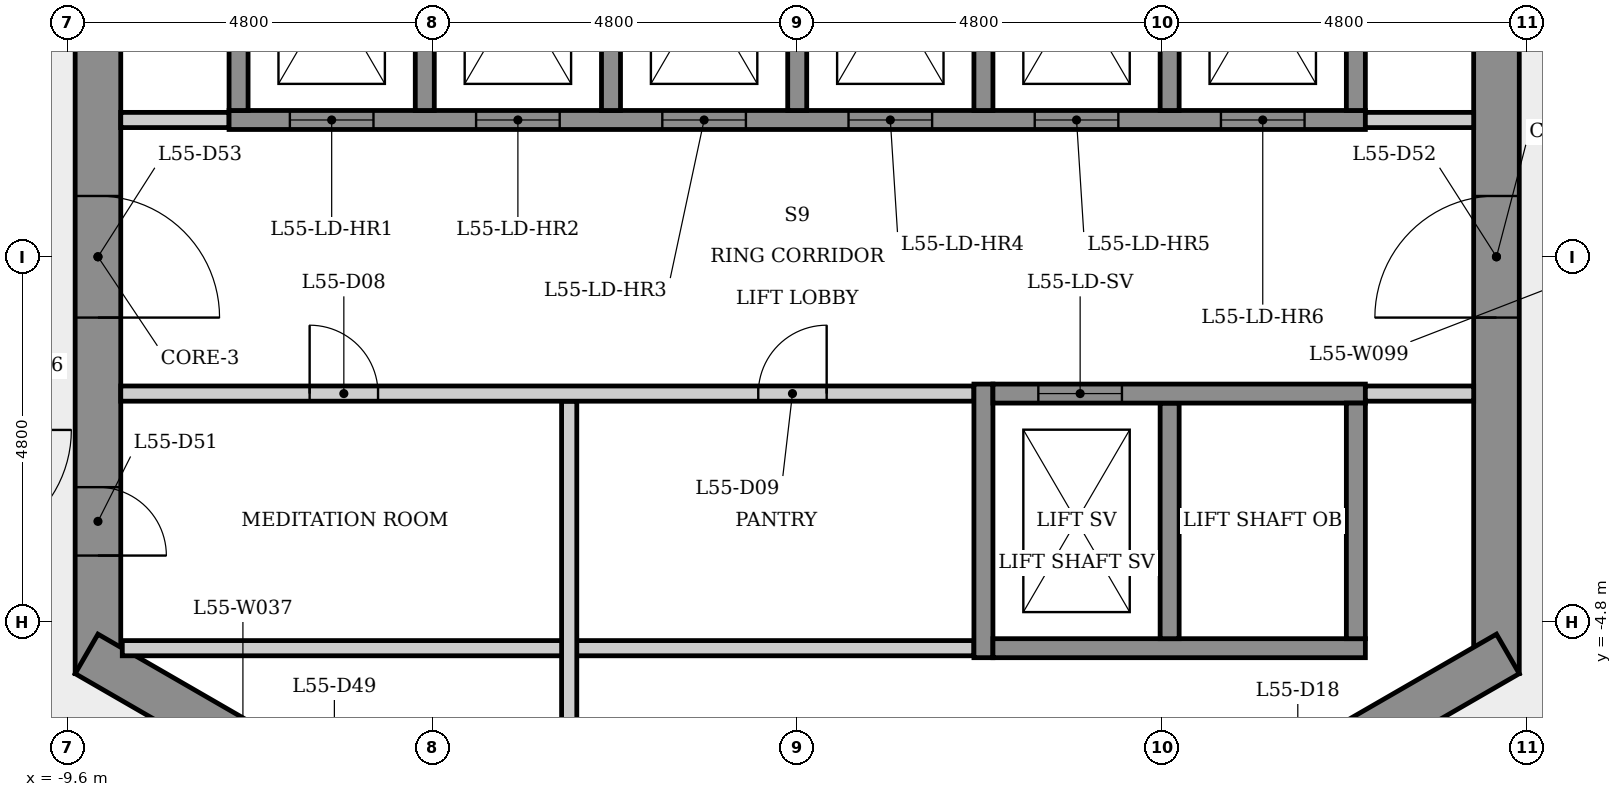
"""IFC4 building model, lengths in metres.
Left out: names, types, materials, properties, quantities, classifications, styles, units other than length and angle.
Written with IfcOpenShell. Run it as: python <this file> out.ifc"""

import sys

from ifc_helpers import new_model, si_unit, direction, frame, frame_2d, origin, place, context, subcontext, project, spatial, rectangle, extrude, element, fill, save


model = new_model("IFC4")
c1 = context("Model", 3, precision=1e-05, world=origin(), true_north=direction((0.0, 1.0)))
c2 = subcontext(c1, "Body", "Model", "MODEL_VIEW")
j1 = project(units=[si_unit("LENGTHUNIT", "METRE"), si_unit("PLANEANGLEUNIT", "RADIAN")], contexts=[c1])
p1 = place(None, origin())
s1 = spatial("IfcSite", under=j1, at=p1, CompositionType="ELEMENT")
p2 = place(p1, origin())
s2 = spatial("IfcBuilding", under=s1, at=p2, CompositionType="ELEMENT")
p3 = place(p2, frame((0.0, 0.0, 206.1)))
s3 = spatial("IfcBuildingStorey", under=s2, at=p3, CompositionType="ELEMENT", Elevation=206.1)
p4 = place(p3, frame((9.2, -5.485, 0.0), z_axis=(0.0, 0.0, 1.0), x_axis=(0.0, 1.0, 0.0)))
e1 = element("IfcWall", 1, at=p4, inside=s3, PredefinedType="SHEAR", context=c2, shape_type="SweptSolid", body=[
    extrude(rectangle(XDim=10.97, YDim=0.6, at=frame_2d((5.485, 0.0))), origin(), (0.0, 0.0, 1.0), 4.0),
])
p5 = place(p4, frame((4.685, 0.0, 0.0)))
e2 = element("IfcOpeningElement", 2, at=p5, cuts=e1, PredefinedType="OPENING", context=c2, shape_type="SweptSolid", body=[
    extrude(rectangle(XDim=1.6, YDim=2.1, at=frame_2d((0.8, 1.05))), frame((0.0, 0.31, 0.0), z_axis=(0.0, -1.0, 0.0), x_axis=(1.0, 0.0, 0.0)), (0.0, 0.0, 1.0), 0.62),
])
p6 = place(p3, frame((-9.2, 5.485, 0.0), z_axis=(0.0, 0.0, 1.0), x_axis=(0.0, -1.0, 0.0)))
e3 = element("IfcWall", 3, at=p6, inside=s3, PredefinedType="SHEAR", context=c2, shape_type="SweptSolid", body=[
    extrude(rectangle(XDim=10.97, YDim=0.6, at=frame_2d((5.485, 0.0))), origin(), (0.0, 0.0, 1.0), 4.0),
])
p7 = place(p6, frame((8.516, 0.0, 0.0)))
e4 = element("IfcOpeningElement", 4, at=p7, cuts=e3, PredefinedType="OPENING", context=c2, shape_type="SweptSolid", body=[
    extrude(rectangle(XDim=0.9, YDim=2.1, at=frame_2d((0.45, 1.05))), frame((0.0, 0.31, 0.0), z_axis=(0.0, -1.0, 0.0), x_axis=(1.0, 0.0, 0.0)), (0.0, 0.0, 1.0), 0.62),
])
p8 = place(p6, frame((4.685, 0.0, 0.0)))
e5 = element("IfcOpeningElement", 5, at=p8, cuts=e3, PredefinedType="OPENING", context=c2, shape_type="SweptSolid", body=[
    extrude(rectangle(XDim=1.6, YDim=2.1, at=frame_2d((0.8, 1.05))), frame((0.0, 0.31, 0.0), z_axis=(0.0, -1.0, 0.0), x_axis=(1.0, 0.0, 0.0)), (0.0, 0.0, 1.0), 0.62),
])
p9 = place(p3, frame((-9.35, -5.225, 0.0), z_axis=(0.0, 0.0, 1.0), x_axis=(0.866023993627, -0.500002442456, 0.0)))
e6 = element("IfcWall", 6, at=p9, inside=s3, PredefinedType="SHEAR", context=c2, shape_type="SweptSolid", body=[
    extrude(rectangle(XDim=10.97, YDim=0.6, at=frame_2d((5.485, 0.0))), origin(), (0.0, 0.0, 1.0), 4.0),
])
p10 = place(p9, frame((3.315, 0.0, 0.0)))
e7 = element("IfcOpeningElement", 7, at=p10, cuts=e6, PredefinedType="OPENING", context=c2, shape_type="SweptSolid", body=[
    extrude(rectangle(XDim=0.9, YDim=2.1, at=frame_2d((0.45, 1.05))), frame((0.0, 0.31, 0.0), z_axis=(0.0, -1.0, 0.0), x_axis=(1.0, 0.0, 0.0)), (0.0, 0.0, 1.0), 0.62),
])
p11 = place(p3, frame((-0.15, -10.71, 0.0), z_axis=(0.0, 0.0, 1.0), x_axis=(0.866023993627, 0.500002442456, 0.0)))
e8 = element("IfcWall", 8, at=p11, inside=s3, PredefinedType="SHEAR", context=c2, shape_type="SweptSolid", body=[
    extrude(rectangle(XDim=10.97, YDim=0.6, at=frame_2d((5.485, 0.0))), origin(), (0.0, 0.0, 1.0), 4.0),
])
p12 = place(p11, frame((4.972, 0.0, 0.0)))
e9 = element("IfcOpeningElement", 9, at=p12, cuts=e8, PredefinedType="OPENING", context=c2, shape_type="SweptSolid", body=[
    extrude(rectangle(XDim=0.9, YDim=2.1, at=frame_2d((0.45, 1.05))), frame((0.0, 0.31, 0.0), z_axis=(0.0, -1.0, 0.0), x_axis=(1.0, 0.0, 0.0)), (0.0, 0.0, 1.0), 0.62),
])
p13 = place(p3, frame((-8.9, 1.8, 0.0), z_axis=(0.0, 0.0, 1.0), x_axis=(1.0, 0.0, 0.0)))
e10 = element("IfcWall", 10, at=p13, inside=s3, PredefinedType="PARTITIONING", context=c2, shape_type="SweptSolid", body=[
    extrude(rectangle(XDim=1.425, YDim=0.2, at=frame_2d((0.712, 0.0))), origin(), (0.0, 0.0, 1.0), 3.6),
])
p14 = place(p3, frame((-8.88, -5.15, 0.0), z_axis=(0.0, 0.0, 1.0), x_axis=(1.0, 0.0, 0.0)))
e11 = element("IfcWall", 11, at=p14, inside=s3, PredefinedType="PARTITIONING", context=c2, shape_type="SweptSolid", body=[
    extrude(rectangle(XDim=11.205, YDim=0.2, at=frame_2d((5.603, 0.0))), origin(), (0.0, 0.0, 1.0), 3.6),
])
p15 = place(p3, frame((-7.475, 1.8, 0.0), z_axis=(0.0, 0.0, 1.0), x_axis=(1.0, 0.0, 0.0)))
e12 = element("IfcWall", 12, at=p15, inside=s3, PredefinedType="SHEAR", context=c2, shape_type="SweptSolid", body=[
    extrude(rectangle(XDim=14.95, YDim=0.25, at=frame_2d((7.475, 0.0))), origin(), (0.0, 0.0, 1.0), 3.6),
])
p16 = place(p15, frame((0.8, 0.0, 0.0)))
e13 = element("IfcOpeningElement", 13, at=p16, cuts=e12, PredefinedType="OPENING", context=c2, shape_type="SweptSolid", body=[
    extrude(rectangle(XDim=1.1, YDim=2.1, at=frame_2d((0.55, 1.05))), frame((0.0, 0.135, 0.0), z_axis=(0.0, -1.0, 0.0), x_axis=(1.0, 0.0, 0.0)), (0.0, 0.0, 1.0), 0.27),
])
p17 = place(p15, frame((3.25, 0.0, 0.0)))
e14 = element("IfcOpeningElement", 14, at=p17, cuts=e12, PredefinedType="OPENING", context=c2, shape_type="SweptSolid", body=[
    extrude(rectangle(XDim=1.1, YDim=2.1, at=frame_2d((0.55, 1.05))), frame((0.0, 0.135, 0.0), z_axis=(0.0, -1.0, 0.0), x_axis=(1.0, 0.0, 0.0)), (0.0, 0.0, 1.0), 0.27),
])
p18 = place(p15, frame((5.7, 0.0, 0.0)))
e15 = element("IfcOpeningElement", 15, at=p18, cuts=e12, PredefinedType="OPENING", context=c2, shape_type="SweptSolid", body=[
    extrude(rectangle(XDim=1.1, YDim=2.1, at=frame_2d((0.55, 1.05))), frame((0.0, 0.135, 0.0), z_axis=(0.0, -1.0, 0.0), x_axis=(1.0, 0.0, 0.0)), (0.0, 0.0, 1.0), 0.27),
])
p19 = place(p15, frame((8.15, 0.0, 0.0)))
e16 = element("IfcOpeningElement", 16, at=p19, cuts=e12, PredefinedType="OPENING", context=c2, shape_type="SweptSolid", body=[
    extrude(rectangle(XDim=1.1, YDim=2.1, at=frame_2d((0.55, 1.05))), frame((0.0, 0.135, 0.0), z_axis=(0.0, -1.0, 0.0), x_axis=(1.0, 0.0, 0.0)), (0.0, 0.0, 1.0), 0.27),
])
p20 = place(p15, frame((10.6, 0.0, 0.0)))
e17 = element("IfcOpeningElement", 17, at=p20, cuts=e12, PredefinedType="OPENING", context=c2, shape_type="SweptSolid", body=[
    extrude(rectangle(XDim=1.1, YDim=2.1, at=frame_2d((0.55, 1.05))), frame((0.0, 0.135, 0.0), z_axis=(0.0, -1.0, 0.0), x_axis=(1.0, 0.0, 0.0)), (0.0, 0.0, 1.0), 0.27),
])
p21 = place(p15, frame((13.05, 0.0, 0.0)))
e18 = element("IfcOpeningElement", 18, at=p21, cuts=e12, PredefinedType="OPENING", context=c2, shape_type="SweptSolid", body=[
    extrude(rectangle(XDim=1.1, YDim=2.1, at=frame_2d((0.55, 1.05))), frame((0.0, 0.135, 0.0), z_axis=(0.0, -1.0, 0.0), x_axis=(1.0, 0.0, 0.0)), (0.0, 0.0, 1.0), 0.27),
])
p22 = place(p3, frame((-7.35, 1.925, 0.0), z_axis=(0.0, 0.0, 1.0), x_axis=(0.0, 1.0, 0.0)))
e19 = element("IfcWall", 19, at=p22, inside=s3, PredefinedType="SHEAR", context=c2, shape_type="SweptSolid", body=[
    extrude(rectangle(XDim=4.036, YDim=0.25, at=frame_2d((2.018, 0.0))), origin(), (0.0, 0.0, 1.0), 3.6),
])
p23 = place(p3, frame((-4.9, 5.025, 0.0), z_axis=(0.0, 0.0, 1.0), x_axis=(0.0, -1.0, 0.0)))
e20 = element("IfcWall", 20, at=p23, inside=s3, PredefinedType="SHEAR", context=c2, shape_type="SweptSolid", body=[
    extrude(rectangle(XDim=3.1, YDim=0.25, at=frame_2d((1.55, 0.0))), origin(), (0.0, 0.0, 1.0), 4.0),
])
p24 = place(p3, frame((-3.0, -8.545, 0.0), z_axis=(0.0, 0.0, 1.0), x_axis=(0.0, 1.0, 0.0)))
e21 = element("IfcWall", 21, at=p24, inside=s3, PredefinedType="PARTITIONING", context=c2, shape_type="SweptSolid", body=[
    extrude(rectangle(XDim=6.645, YDim=0.2, at=frame_2d((3.323, 0.0))), origin(), (0.0, 0.0, 1.0), 3.6),
])
p25 = place(p3, frame((-8.9, -1.8, 0.0), z_axis=(0.0, 0.0, 1.0), x_axis=(1.0, 0.0, 0.0)))
e22 = element("IfcWall", 22, at=p25, inside=s3, PredefinedType="PARTITIONING", context=c2, shape_type="SweptSolid", body=[
    extrude(rectangle(XDim=11.225, YDim=0.2, at=frame_2d((5.613, 0.0))), origin(), (0.0, 0.0, 1.0), 3.6),
])
p26 = place(p25, frame((2.485, 0.0, 0.0)))
e23 = element("IfcOpeningElement", 23, at=p26, cuts=e22, PredefinedType="OPENING", context=c2, shape_type="SweptSolid", body=[
    extrude(rectangle(XDim=0.9, YDim=2.1, at=frame_2d((0.45, 1.05))), frame((0.0, 0.11, 0.0), z_axis=(0.0, -1.0, 0.0), x_axis=(1.0, 0.0, 0.0)), (0.0, 0.0, 1.0), 0.22),
])
p27 = place(p25, frame((8.387, 0.0, 0.0)))
e24 = element("IfcOpeningElement", 24, at=p27, cuts=e22, PredefinedType="OPENING", context=c2, shape_type="SweptSolid", body=[
    extrude(rectangle(XDim=0.9, YDim=2.1, at=frame_2d((0.45, 1.05))), frame((0.0, 0.11, 0.0), z_axis=(0.0, -1.0, 0.0), x_axis=(1.0, 0.0, 0.0)), (0.0, 0.0, 1.0), 0.22),
])
for number, where, z_axis, x_axis in (
    (25, (-2.45, 5.025, 0.0), (0.0, 0.0, 1.0), (0.0, -1.0, 0.0)),
    (26, (0.0, 5.025, 0.0), (0.0, 0.0, 1.0), (0.0, -1.0, 0.0)),
):
    element("IfcWall", number, at=place(p3, frame(where, z_axis=z_axis, x_axis=x_axis)), inside=s3, PredefinedType="SHEAR", context=c2, shape_type="SweptSolid", body=[
        extrude(rectangle(XDim=3.1, YDim=0.25, at=frame_2d((1.55, 0.0))), origin(), (0.0, 0.0, 1.0), 4.0),
    ])
p28 = place(p3, frame((2.45, -5.275, 0.0), z_axis=(0.0, 0.0, 1.0), x_axis=(0.0, 1.0, 0.0)))
e27 = element("IfcWall", 27, at=p28, inside=s3, PredefinedType="SHEAR", context=c2, shape_type="SweptSolid", body=[
    extrude(rectangle(XDim=3.6, YDim=0.25, at=frame_2d((1.8, 0.0))), origin(), (0.0, 0.0, 1.0), 3.6),
])
p29 = place(p3, frame((2.45, 5.025, 0.0), z_axis=(0.0, 0.0, 1.0), x_axis=(0.0, -1.0, 0.0)))
e28 = element("IfcWall", 28, at=p29, inside=s3, PredefinedType="SHEAR", context=c2, shape_type="SweptSolid", body=[
    extrude(rectangle(XDim=3.1, YDim=0.25, at=frame_2d((1.55, 0.0))), origin(), (0.0, 0.0, 1.0), 4.0),
])
p30 = place(p3, frame((2.575, -5.15, 0.0), z_axis=(0.0, 0.0, 1.0), x_axis=(1.0, 0.0, 0.0)))
e29 = element("IfcWall", 29, at=p30, inside=s3, PredefinedType="SHEAR", context=c2, shape_type="SweptSolid", body=[
    extrude(rectangle(XDim=4.9, YDim=0.25, at=frame_2d((2.45, 0.0))), origin(), (0.0, 0.0, 1.0), 3.6),
])
for number, where, z_axis, x_axis in (
    (30, (4.9, -1.925, 0.0), (0.0, 0.0, 1.0), (0.0, -1.0, 0.0)),
    (31, (4.9, 5.025, 0.0), (0.0, 0.0, 1.0), (0.0, -1.0, 0.0)),
):
    element("IfcWall", number, at=place(p3, frame(where, z_axis=z_axis, x_axis=x_axis)), inside=s3, PredefinedType="SHEAR", context=c2, shape_type="SweptSolid", body=[
        extrude(rectangle(XDim=3.1, YDim=0.25, at=frame_2d((1.55, 0.0))), origin(), (0.0, 0.0, 1.0), 4.0),
    ])
p31 = place(p3, frame((2.575, -1.8, 0.0), z_axis=(0.0, 0.0, 1.0), x_axis=(1.0, 0.0, 0.0)))
e32 = element("IfcWall", 32, at=p31, inside=s3, PredefinedType="SHEAR", context=c2, shape_type="SweptSolid", body=[
    extrude(rectangle(XDim=4.9, YDim=0.25, at=frame_2d((2.45, 0.0))), origin(), (0.0, 0.0, 1.0), 3.6),
])
p32 = place(p31, frame((0.597, 0.0, 0.0)))
e33 = element("IfcOpeningElement", 33, at=p32, cuts=e32, PredefinedType="OPENING", context=c2, shape_type="SweptSolid", body=[
    extrude(rectangle(XDim=1.1, YDim=2.1, at=frame_2d((0.55, 1.05))), frame((0.0, 0.135, 0.0), z_axis=(0.0, -1.0, 0.0), x_axis=(1.0, 0.0, 0.0)), (0.0, 0.0, 1.0), 0.27),
])
p33 = place(p3, frame((7.475, 1.8, 0.0), z_axis=(0.0, 0.0, 1.0), x_axis=(1.0, 0.0, 0.0)))
e34 = element("IfcWall", 34, at=p33, inside=s3, PredefinedType="PARTITIONING", context=c2, shape_type="SweptSolid", body=[
    extrude(rectangle(XDim=1.425, YDim=0.2, at=frame_2d((0.712, 0.0))), origin(), (0.0, 0.0, 1.0), 3.6),
])
for number, where, z_axis, x_axis in (
    (35, (7.35, -1.925, 0.0), (0.0, 0.0, 1.0), (0.0, -1.0, 0.0)),
    (36, (7.35, 5.025, 0.0), (0.0, 0.0, 1.0), (0.0, -1.0, 0.0)),
):
    element("IfcWall", number, at=place(p3, frame(where, z_axis=z_axis, x_axis=x_axis)), inside=s3, PredefinedType="SHEAR", context=c2, shape_type="SweptSolid", body=[
        extrude(rectangle(XDim=3.1, YDim=0.25, at=frame_2d((1.55, 0.0))), origin(), (0.0, 0.0, 1.0), 4.0),
    ])
p34 = place(p3, frame((8.9, -1.8, 0.0), z_axis=(0.0, 0.0, 1.0), x_axis=(-1.0, 0.0, 0.0)))
e37 = element("IfcWall", 37, at=p34, inside=s3, PredefinedType="PARTITIONING", context=c2, shape_type="SweptSolid", body=[
    extrude(rectangle(XDim=1.425, YDim=0.2, at=frame_2d((0.712, 0.0))), origin(), (0.0, 0.0, 1.0), 3.6),
])
p35 = place(p16, origin())
e38 = element("IfcDoor", 38, at=p35, inside=s3, OperationType="SLIDING_TO_LEFT", PredefinedType="DOOR", context=c2, shape_type="SweptSolid", body=[
    extrude(rectangle(XDim=1.1, YDim=2.1, at=frame_2d((0.55, 1.05))), frame((0.0, 0.025, 0.0), z_axis=(0.0, -1.0, 0.0), x_axis=(1.0, 0.0, 0.0)), (0.0, 0.0, 1.0), 0.05),
])
fill(e13, e38)
p36 = place(p17, origin())
e39 = element("IfcDoor", 39, at=p36, inside=s3, OperationType="SLIDING_TO_LEFT", PredefinedType="DOOR", context=c2, shape_type="SweptSolid", body=[
    extrude(rectangle(XDim=1.1, YDim=2.1, at=frame_2d((0.55, 1.05))), frame((0.0, 0.025, 0.0), z_axis=(0.0, -1.0, 0.0), x_axis=(1.0, 0.0, 0.0)), (0.0, 0.0, 1.0), 0.05),
])
fill(e14, e39)
p37 = place(p18, origin())
e40 = element("IfcDoor", 40, at=p37, inside=s3, OperationType="SLIDING_TO_LEFT", PredefinedType="DOOR", context=c2, shape_type="SweptSolid", body=[
    extrude(rectangle(XDim=1.1, YDim=2.1, at=frame_2d((0.55, 1.05))), frame((0.0, 0.025, 0.0), z_axis=(0.0, -1.0, 0.0), x_axis=(1.0, 0.0, 0.0)), (0.0, 0.0, 1.0), 0.05),
])
fill(e15, e40)
p38 = place(p19, origin())
e41 = element("IfcDoor", 41, at=p38, inside=s3, OperationType="SLIDING_TO_LEFT", PredefinedType="DOOR", context=c2, shape_type="SweptSolid", body=[
    extrude(rectangle(XDim=1.1, YDim=2.1, at=frame_2d((0.55, 1.05))), frame((0.0, 0.025, 0.0), z_axis=(0.0, -1.0, 0.0), x_axis=(1.0, 0.0, 0.0)), (0.0, 0.0, 1.0), 0.05),
])
fill(e16, e41)
p39 = place(p20, origin())
e42 = element("IfcDoor", 42, at=p39, inside=s3, OperationType="SLIDING_TO_LEFT", PredefinedType="DOOR", context=c2, shape_type="SweptSolid", body=[
    extrude(rectangle(XDim=1.1, YDim=2.1, at=frame_2d((0.55, 1.05))), frame((0.0, 0.025, 0.0), z_axis=(0.0, -1.0, 0.0), x_axis=(1.0, 0.0, 0.0)), (0.0, 0.0, 1.0), 0.05),
])
fill(e17, e42)
p40 = place(p21, origin())
e43 = element("IfcDoor", 43, at=p40, inside=s3, OperationType="SLIDING_TO_LEFT", PredefinedType="DOOR", context=c2, shape_type="SweptSolid", body=[
    extrude(rectangle(XDim=1.1, YDim=2.1, at=frame_2d((0.55, 1.05))), frame((0.0, 0.025, 0.0), z_axis=(0.0, -1.0, 0.0), x_axis=(1.0, 0.0, 0.0)), (0.0, 0.0, 1.0), 0.05),
])
fill(e18, e43)
p41 = place(p32, origin())
e44 = element("IfcDoor", 44, at=p41, inside=s3, OperationType="SLIDING_TO_LEFT", PredefinedType="DOOR", context=c2, shape_type="SweptSolid", body=[
    extrude(rectangle(XDim=1.1, YDim=2.1, at=frame_2d((0.55, 1.05))), frame((0.0, 0.025, 0.0), z_axis=(0.0, -1.0, 0.0), x_axis=(1.0, 0.0, 0.0)), (0.0, 0.0, 1.0), 0.05),
])
fill(e33, e44)
p42 = place(p26, origin())
e45 = element("IfcDoor", 45, at=p42, inside=s3, OperationType="SINGLE_SWING_LEFT", PredefinedType="DOOR", context=c2, shape_type="SweptSolid", body=[
    extrude(rectangle(XDim=0.9, YDim=2.1, at=frame_2d((0.45, 1.05))), frame((0.0, 0.025, 0.0), z_axis=(0.0, -1.0, 0.0), x_axis=(1.0, 0.0, 0.0)), (0.0, 0.0, 1.0), 0.05),
])
fill(e23, e45)
p43 = place(p27, origin())
e46 = element("IfcDoor", 46, at=p43, inside=s3, OperationType="SINGLE_SWING_RIGHT", PredefinedType="DOOR", context=c2, shape_type="SweptSolid", body=[
    extrude(rectangle(XDim=0.9, YDim=2.1, at=frame_2d((0.45, 1.05))), frame((0.0, 0.025, 0.0), z_axis=(0.0, -1.0, 0.0), x_axis=(1.0, 0.0, 0.0)), (0.0, 0.0, 1.0), 0.05),
])
fill(e24, e46)
p44 = place(p7, origin())
e47 = element("IfcDoor", 47, at=p44, inside=s3, OperationType="SINGLE_SWING_RIGHT", PredefinedType="DOOR", context=c2, shape_type="SweptSolid", body=[
    extrude(rectangle(XDim=0.9, YDim=2.1, at=frame_2d((0.45, 1.05))), frame((0.0, 0.025, 0.0), z_axis=(0.0, -1.0, 0.0), x_axis=(1.0, 0.0, 0.0)), (0.0, 0.0, 1.0), 0.05),
])
fill(e4, e47)
p45 = place(p5, origin())
e48 = element("IfcDoor", 48, at=p45, inside=s3, OperationType="SINGLE_SWING_LEFT", PredefinedType="DOOR", context=c2, shape_type="SweptSolid", body=[
    extrude(rectangle(XDim=1.6, YDim=2.1, at=frame_2d((0.8, 1.05))), frame((0.0, 0.025, 0.0), z_axis=(0.0, -1.0, 0.0), x_axis=(1.0, 0.0, 0.0)), (0.0, 0.0, 1.0), 0.05),
])
fill(e2, e48)
p46 = place(p8, origin())
e49 = element("IfcDoor", 49, at=p46, inside=s3, OperationType="SINGLE_SWING_RIGHT", PredefinedType="DOOR", context=c2, shape_type="SweptSolid", body=[
    extrude(rectangle(XDim=1.6, YDim=2.1, at=frame_2d((0.8, 1.05))), frame((0.0, 0.025, 0.0), z_axis=(0.0, -1.0, 0.0), x_axis=(1.0, 0.0, 0.0)), (0.0, 0.0, 1.0), 0.05),
])
fill(e5, e49)
save(model, sys.argv[1])
